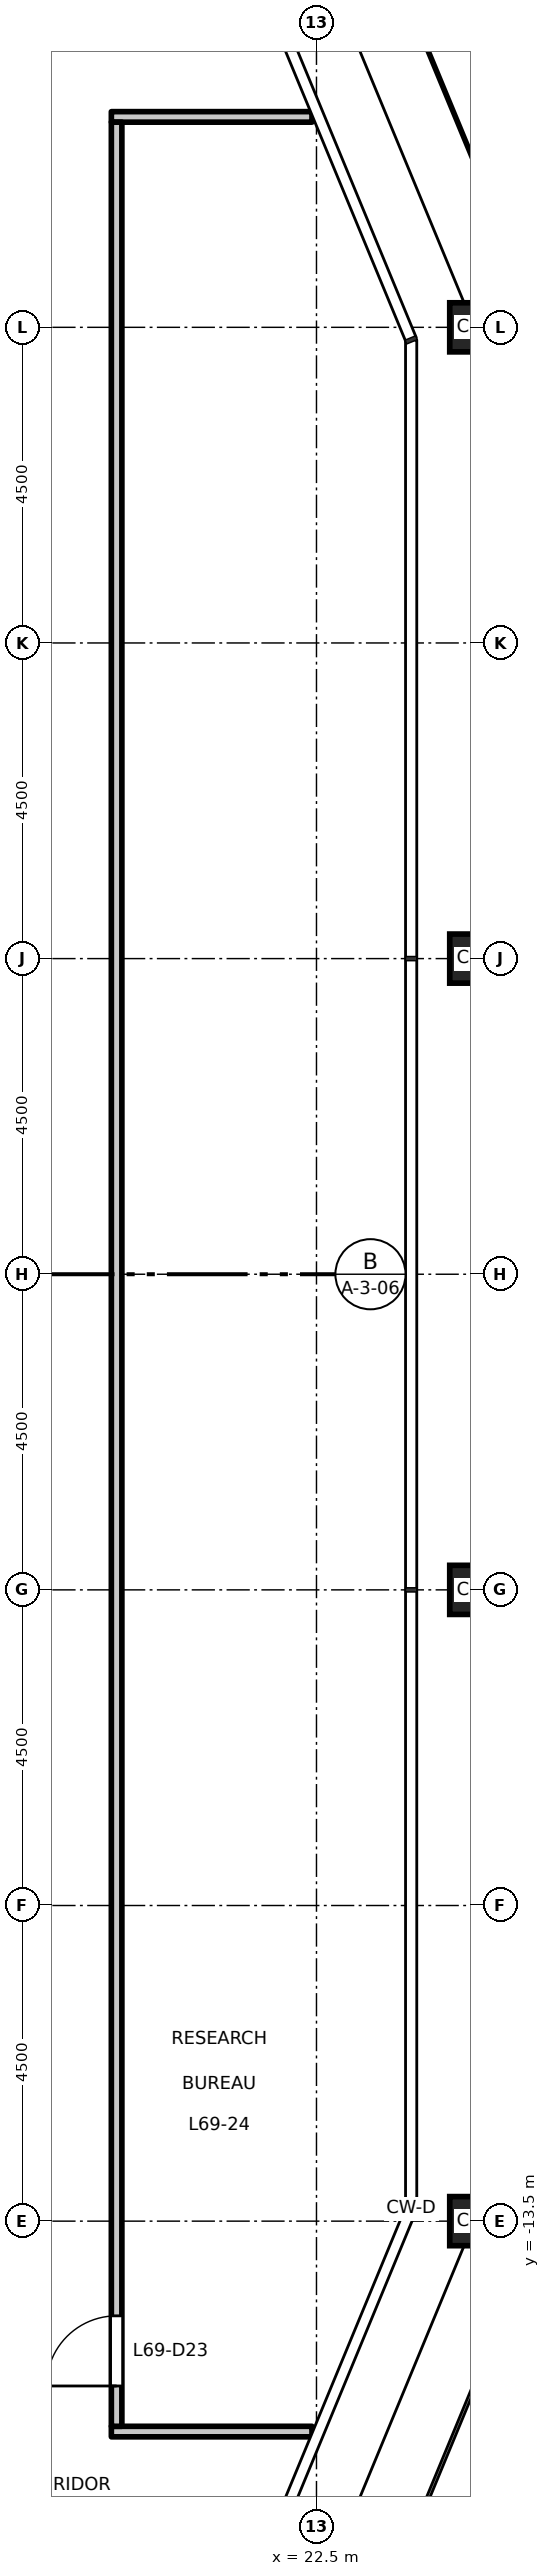
"""IFC4 building model, lengths in metres.
Left out: names, types, materials, properties, quantities, classifications, styles, units other than length and angle.
Written with IfcOpenShell. Run it as: python <this file> out.ifc"""

import sys

from ifc_helpers import new_model, si_unit, direction, frame, frame_2d, origin, origin_2d, place, context, subcontext, project, spatial, rectangle, hollow_rectangle, extrude, element, fill, save


model = new_model("IFC4")
c1 = context("Model", 3, precision=1e-05, world=origin(), true_north=direction((0.0, 1.0)))
c2 = subcontext(c1, "Body", "Model", "MODEL_VIEW")
j1 = project(units=[si_unit("LENGTHUNIT", "METRE"), si_unit("PLANEANGLEUNIT", "RADIAN")], contexts=[c1])
p1 = place(None, origin())
s1 = spatial("IfcSite", under=j1, at=p1, CompositionType="ELEMENT")
p2 = place(p1, origin())
s2 = spatial("IfcBuilding", under=s1, at=p2, CompositionType="ELEMENT")
p3 = place(p2, frame((0.0, 0.0, 321.2)))
s3 = spatial("IfcBuildingStorey", under=s2, at=p3, CompositionType="ELEMENT", Elevation=321.2)
for number, where, z_axis, x_axis in (
    (1, (24.75, -13.5, 0.0), (0.0, 0.0, 1.0), (1.0, 0.0, 0.0)),
    (2, (24.75, -4.5, 0.0), (0.0, 0.0, 1.0), (1.0, 0.0, 0.0)),
    (3, (24.75, 4.5, 0.0), (0.0, 0.0, 1.0), (1.0, 0.0, 0.0)),
    (4, (24.75, 13.5, 0.0), (0.0, 0.0, 1.0), (1.0, 0.0, 0.0)),
):
    element("IfcColumn", number, at=place(p3, frame(where, z_axis=z_axis, x_axis=x_axis)), inside=s3, PredefinedType="COLUMN", context=c2, shape_type="SweptSolid", body=[
        extrude(hollow_rectangle(XDim=0.7, YDim=0.7, WallThickness=0.036, at=origin_2d()), origin(), (0.0, 0.0, 1.0), 4.5),
    ])
for number, where, z_axis, x_axis in (
    (5, (19.575, -16.5, 0.0), (0.0, 0.0, 1.0), (1.0, 0.0, 0.0)),
    (6, (19.575, 16.5, 0.0), (0.0, 0.0, 1.0), (1.0, 0.0, 0.0)),
):
    element("IfcWall", number, at=place(p3, frame(where, z_axis=z_axis, x_axis=x_axis)), inside=s3, PredefinedType="PARTITIONING", context=c2, shape_type="SweptSolid", body=[
        extrude(rectangle(XDim=2.861, YDim=0.15, at=frame_2d((1.431, 0.0))), origin(), (0.0, 0.0, 1.0), 4.35),
    ])
p4 = place(p3, frame((19.65, -16.425, 0.0), z_axis=(0.0, 0.0, 1.0), x_axis=(0.0, 1.0, 0.0)))
e7 = element("IfcWall", 7, at=p4, inside=s3, PredefinedType="PARTITIONING", context=c2, shape_type="SweptSolid", body=[
    extrude(rectangle(XDim=32.85, YDim=0.15, at=frame_2d((16.425, 0.0))), origin(), (0.0, 0.0, 1.0), 4.35),
])
p5 = place(p4, frame((0.575, 0.0, 0.0)))
e8 = element("IfcOpeningElement", 8, at=p5, cuts=e7, PredefinedType="OPENING", context=c2, shape_type="SweptSolid", body=[
    extrude(rectangle(XDim=1.0, YDim=2.1, at=frame_2d((0.5, 1.05))), frame((0.0, 0.085, 0.0), z_axis=(0.0, -1.0, 0.0), x_axis=(1.0, 0.0, 0.0)), (0.0, 0.0, 1.0), 0.17),
])
p6 = place(p5, origin())
e9 = element("IfcDoor", 9, at=p6, inside=s3, OperationType="SINGLE_SWING_LEFT", PredefinedType="DOOR", context=c2, shape_type="SweptSolid", body=[
    extrude(rectangle(XDim=1.0, YDim=2.1, at=frame_2d((0.5, 1.05))), frame((0.0, 0.025, 0.0), z_axis=(0.0, -1.0, 0.0), x_axis=(1.0, 0.0, 0.0)), (0.0, 0.0, 1.0), 0.05),
])
fill(e8, e9)
save(model, sys.argv[1])
